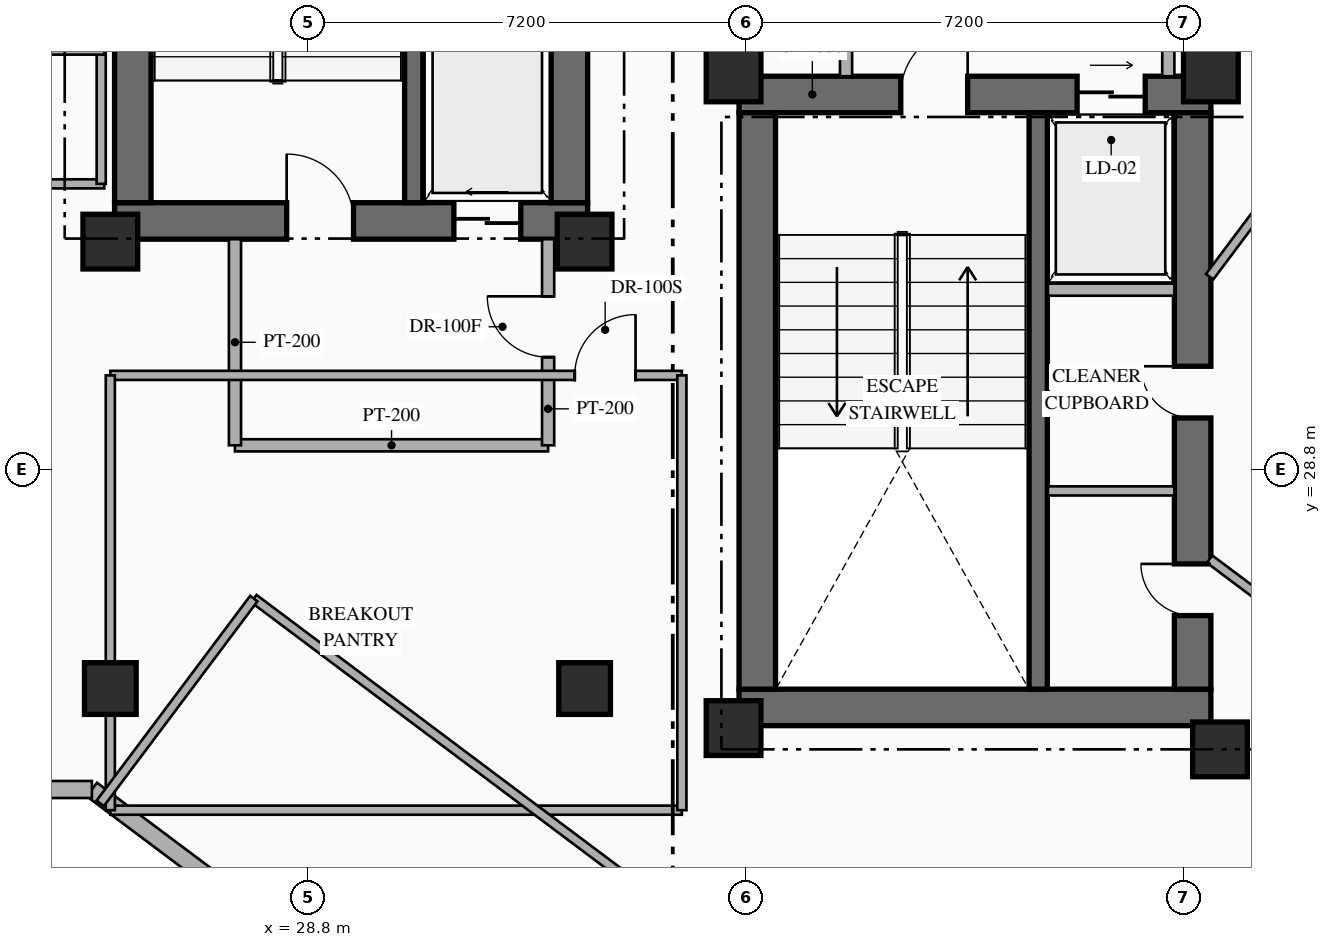
"""IFC4 building model, lengths in metres.
Left out: names, types, materials, properties, quantities, classifications, styles, units other than length and angle.
Written with IfcOpenShell. Run it as: python <this file> out.ifc"""

import sys

from ifc_helpers import new_model, si_unit, direction, frame, frame_2d, origin, origin_2d, place, context, subcontext, project, spatial, rectangle, hollow_rectangle, extrude, element, fill, save


model = new_model("IFC4")
c1 = context("Model", 3, precision=1e-05, world=origin(), true_north=direction((0.0, 1.0)))
c2 = subcontext(c1, "Body", "Model", "MODEL_VIEW")
j1 = project(units=[si_unit("LENGTHUNIT", "METRE"), si_unit("PLANEANGLEUNIT", "RADIAN")], contexts=[c1])
p1 = place(None, origin())
s1 = spatial("IfcSite", under=j1, at=p1, CompositionType="ELEMENT")
p2 = place(p1, origin())
s2 = spatial("IfcBuilding", under=s1, at=p2, CompositionType="ELEMENT")
p3 = place(p2, frame((0.0, 0.0, 134.85)))
s3 = spatial("IfcBuildingStorey", under=s2, at=p3, CompositionType="ELEMENT", Elevation=134.85)
p4 = place(p3, frame((25.62, 32.89, 0.0), z_axis=(0.0, 0.0, 1.0), x_axis=(1.0, 0.0, 0.0)))
e1 = element("IfcWall", 1, at=p4, inside=s3, PredefinedType="SHEAR", context=c2, shape_type="SweptSolid", body=[
    extrude(rectangle(XDim=7.78, YDim=0.6, at=frame_2d((3.89, 0.0))), origin(), (0.0, 0.0, 1.0), 3.6),
])
p5 = place(p4, frame((2.83, 0.0, 0.0)))
e2 = element("IfcOpeningElement", 2, at=p5, cuts=e1, PredefinedType="OPENING", context=c2, shape_type="SweptSolid", body=[
    extrude(rectangle(XDim=1.1, YDim=2.2, at=frame_2d((0.55, 1.1))), frame((0.0, 0.31, 0.0), z_axis=(0.0, -1.0, 0.0), x_axis=(1.0, 0.0, 0.0)), (0.0, 0.0, 1.0), 0.62),
])
p6 = place(p4, frame((5.58, 0.0, 0.0)))
e3 = element("IfcOpeningElement", 3, at=p6, cuts=e1, PredefinedType="OPENING", context=c2, shape_type="SweptSolid", body=[
    extrude(rectangle(XDim=1.1, YDim=2.15, at=frame_2d((0.55, 1.075))), frame((0.0, 0.31, 0.0), z_axis=(0.0, -1.0, 0.0), x_axis=(1.0, 0.0, 0.0)), (0.0, 0.0, 1.0), 0.62),
])
p7 = place(p3, frame((25.92, 33.19, 0.0), z_axis=(0.0, 0.0, 1.0), x_axis=(0.0, 1.0, 0.0)))
e4 = element("IfcWall", 4, at=p7, inside=s3, PredefinedType="SHEAR", context=c2, shape_type="SweptSolid", body=[
    extrude(rectangle(XDim=9.48, YDim=0.6, at=frame_2d((4.74, 0.0))), origin(), (0.0, 0.0, 1.0), 3.6),
])
p8 = place(p3, frame((33.1, 33.19, 0.0), z_axis=(0.0, 0.0, 1.0), x_axis=(0.0, 1.0, 0.0)))
e5 = element("IfcWall", 5, at=p8, inside=s3, PredefinedType="SHEAR", context=c2, shape_type="SweptSolid", body=[
    extrude(rectangle(XDim=9.48, YDim=0.6, at=frame_2d((4.74, 0.0))), origin(), (0.0, 0.0, 1.0), 3.6),
])
p9 = place(p8, frame((4.16, 0.0, 0.0)))
e6 = element("IfcOpeningElement", 6, at=p9, cuts=e5, PredefinedType="OPENING", context=c2, shape_type="SweptSolid", body=[
    extrude(rectangle(XDim=0.85, YDim=2.08, at=frame_2d((0.425, 1.04))), frame((0.0, 0.31, 0.0), z_axis=(0.0, -1.0, 0.0), x_axis=(1.0, 0.0, 0.0)), (0.0, 0.0, 1.0), 0.62),
])
p10 = place(p8, frame((7.36, 0.0, 0.0)))
e7 = element("IfcOpeningElement", 7, at=p10, cuts=e5, PredefinedType="OPENING", context=c2, shape_type="SweptSolid", body=[
    extrude(rectangle(XDim=0.85, YDim=2.08, at=frame_2d((0.425, 1.04))), frame((0.0, 0.31, 0.0), z_axis=(0.0, -1.0, 0.0), x_axis=(1.0, 0.0, 0.0)), (0.0, 0.0, 1.0), 0.62),
])
p11 = place(p3, frame((30.54, 33.19, 0.0), z_axis=(0.0, 0.0, 1.0), x_axis=(0.0, 1.0, 0.0)))
e8 = element("IfcWall", 8, at=p11, inside=s3, PredefinedType="SHEAR", context=c2, shape_type="SweptSolid", body=[
    extrude(rectangle(XDim=9.48, YDim=0.3, at=frame_2d((4.74, 0.0))), origin(), (0.0, 0.0, 1.0), 3.6),
])
p12 = place(p3, frame((35.89, 24.89, 0.0), z_axis=(0.0, 0.0, 1.0), x_axis=(1.0, 0.0, 0.0)))
e9 = element("IfcWall", 9, at=p12, inside=s3, PredefinedType="SHEAR", context=c2, shape_type="SweptSolid", body=[
    extrude(rectangle(XDim=7.76, YDim=0.6, at=frame_2d((3.88, 0.0))), origin(), (0.0, 0.0, 1.0), 3.6),
])
p13 = place(p3, frame((35.89, 34.97, 0.0), z_axis=(0.0, 0.0, 1.0), x_axis=(1.0, 0.0, 0.0)))
e10 = element("IfcWall", 10, at=p13, inside=s3, PredefinedType="SHEAR", context=c2, shape_type="SweptSolid", body=[
    extrude(rectangle(XDim=7.76, YDim=0.6, at=frame_2d((3.88, 0.0))), origin(), (0.0, 0.0, 1.0), 3.6),
])
p14 = place(p13, frame((2.66, 0.0, 0.0)))
e11 = element("IfcOpeningElement", 11, at=p14, cuts=e10, PredefinedType="OPENING", context=c2, shape_type="SweptSolid", body=[
    extrude(rectangle(XDim=1.1, YDim=2.2, at=frame_2d((0.55, 1.1))), frame((0.0, 0.31, 0.0), z_axis=(0.0, -1.0, 0.0), x_axis=(1.0, 0.0, 0.0)), (0.0, 0.0, 1.0), 0.62),
])
p15 = place(p13, frame((5.56, 0.0, 0.0)))
e12 = element("IfcOpeningElement", 12, at=p15, cuts=e10, PredefinedType="OPENING", context=c2, shape_type="SweptSolid", body=[
    extrude(rectangle(XDim=1.12, YDim=2.15, at=frame_2d((0.56, 1.075))), frame((0.0, 0.31, 0.0), z_axis=(0.0, -1.0, 0.0), x_axis=(1.0, 0.0, 0.0)), (0.0, 0.0, 1.0), 0.62),
])
p16 = place(p3, frame((36.19, 25.19, 0.0), z_axis=(0.0, 0.0, 1.0), x_axis=(0.0, 1.0, 0.0)))
e13 = element("IfcWall", 13, at=p16, inside=s3, PredefinedType="SHEAR", context=c2, shape_type="SweptSolid", body=[
    extrude(rectangle(XDim=9.48, YDim=0.6, at=frame_2d((4.74, 0.0))), origin(), (0.0, 0.0, 1.0), 3.6),
])
p17 = place(p3, frame((43.35, 25.19, 0.0), z_axis=(0.0, 0.0, 1.0), x_axis=(0.0, 1.0, 0.0)))
e14 = element("IfcWall", 14, at=p17, inside=s3, PredefinedType="SHEAR", context=c2, shape_type="SweptSolid", body=[
    extrude(rectangle(XDim=9.48, YDim=0.6, at=frame_2d((4.74, 0.0))), origin(), (0.0, 0.0, 1.0), 3.6),
])
p18 = place(p17, frame((1.21, 0.0, 0.0)))
e15 = element("IfcOpeningElement", 15, at=p18, cuts=e14, PredefinedType="OPENING", context=c2, shape_type="SweptSolid", body=[
    extrude(rectangle(XDim=0.85, YDim=2.08, at=frame_2d((0.425, 1.04))), frame((0.0, 0.31, 0.0), z_axis=(0.0, -1.0, 0.0), x_axis=(1.0, 0.0, 0.0)), (0.0, 0.0, 1.0), 0.62),
])
p19 = place(p17, frame((4.46, 0.0, 0.0)))
e16 = element("IfcOpeningElement", 16, at=p19, cuts=e14, PredefinedType="OPENING", context=c2, shape_type="SweptSolid", body=[
    extrude(rectangle(XDim=0.85, YDim=2.08, at=frame_2d((0.425, 1.04))), frame((0.0, 0.31, 0.0), z_axis=(0.0, -1.0, 0.0), x_axis=(1.0, 0.0, 0.0)), (0.0, 0.0, 1.0), 0.62),
])
p20 = place(p3, frame((40.81, 25.19, 0.0), z_axis=(0.0, 0.0, 1.0), x_axis=(0.0, 1.0, 0.0)))
e17 = element("IfcWall", 17, at=p20, inside=s3, PredefinedType="SHEAR", context=c2, shape_type="SweptSolid", body=[
    extrude(rectangle(XDim=9.48, YDim=0.3, at=frame_2d((4.74, 0.0))), origin(), (0.0, 0.0, 1.0), 3.6),
])
for number, where, z_axis, x_axis in (
    (18, (25.55, 32.55, 0.0), (0.0, 0.0, 1.0), (1.0, 0.0, 0.0)),
    (19, (33.35, 32.55, 0.0), (0.0, 0.0, 1.0), (1.0, 0.0, 0.0)),
    (20, (35.8, 24.55, 0.0), (0.0, 0.0, 1.0), (1.0, 0.0, 0.0)),
    (21, (43.8, 24.2, 0.0), (0.0, 0.0, 1.0), (1.0, 0.0, 0.0)),
    (22, (35.8, 35.3, 0.0), (0.0, 0.0, 1.0), (1.0, 0.0, 0.0)),
    (23, (43.65, 35.3, 0.0), (0.0, 0.0, 1.0), (1.0, 0.0, 0.0)),
):
    element("IfcColumn", number, at=place(p3, frame(where, z_axis=z_axis, x_axis=x_axis)), inside=s3, PredefinedType="COLUMN", context=c2, shape_type="SweptSolid", body=[
        extrude(rectangle(XDim=0.9, YDim=0.9, at=origin_2d()), origin(), (0.0, 0.0, 1.0), 3.6),
    ])
for number, where, z_axis, x_axis in (
    (24, (25.55, 25.2, 0.0), (0.0, 0.0, 1.0), (1.0, 0.0, 0.0)),
    (25, (33.35, 25.2, 0.0), (0.0, 0.0, 1.0), (1.0, 0.0, 0.0)),
):
    element("IfcColumn", number, at=place(p3, frame(where, z_axis=z_axis, x_axis=x_axis)), inside=s3, PredefinedType="COLUMN", context=c2, shape_type="SweptSolid", body=[
        extrude(hollow_rectangle(XDim=0.85, YDim=0.85, WallThickness=0.032, at=origin_2d()), origin(), (0.0, 0.0, 1.0), 3.6),
    ])
p21 = place(p3, frame((44.918, 8.787, 0.0), z_axis=(0.0, 0.0, 1.0), x_axis=(-0.800004765927, 0.599993645378, 0.0)))
e26 = element("IfcWall", 26, at=p21, inside=s3, PredefinedType="STANDARD", context=c2, shape_type="SweptSolid", body=[
    extrude(rectangle(XDim=24.588, YDim=0.28, at=frame_2d((12.294, 0.0))), origin(), (0.0, 0.0, 1.0), 3.35),
])
p22 = place(p3, frame((25.247, 23.54, 0.0), z_axis=(0.0, 0.0, 1.0), x_axis=(-1.0, 0.0, 0.0)))
e27 = element("IfcWall", 27, at=p22, inside=s3, PredefinedType="STANDARD", context=c2, shape_type="SweptSolid", body=[
    extrude(rectangle(XDim=6.747, YDim=0.28, at=frame_2d((3.374, 0.0))), origin(), (0.0, 0.0, 1.0), 3.35),
])
p23 = place(p3, frame((40.97, 31.76, 0.0), z_axis=(0.0, 0.0, 1.0), x_axis=(1.0, 0.0, 0.0)))
e28 = element("IfcWall", 28, at=p23, inside=s3, PredefinedType="STANDARD", context=c2, shape_type="SweptSolid", body=[
    extrude(rectangle(XDim=2.08, YDim=0.2, at=frame_2d((1.04, 0.0))), origin(), (0.0, 0.0, 1.0), 3.35),
])
p24 = place(p3, frame((40.97, 28.45, 0.0), z_axis=(0.0, 0.0, 1.0), x_axis=(1.0, 0.0, 0.0)))
e29 = element("IfcWall", 29, at=p24, inside=s3, PredefinedType="PARTITIONING", context=c2, shape_type="SweptSolid", body=[
    extrude(rectangle(XDim=2.08, YDim=0.15, at=frame_2d((1.04, 0.0))), origin(), (0.0, 0.0, 1.0), 3.35),
])
p25 = place(p3, frame((27.6, 29.2, 0.0), z_axis=(0.0, 0.0, 1.0), x_axis=(1.0, 0.0, 0.0)))
e30 = element("IfcWall", 30, at=p25, inside=s3, PredefinedType="STANDARD", context=c2, shape_type="SweptSolid", body=[
    extrude(rectangle(XDim=5.15, YDim=0.2, at=frame_2d((2.575, 0.0))), origin(), (0.0, 0.0, 1.0), 3.35),
])
p26 = place(p3, frame((27.6, 29.2, 0.0), z_axis=(0.0, 0.0, 1.0), x_axis=(0.0, 1.0, 0.0)))
e31 = element("IfcWall", 31, at=p26, inside=s3, PredefinedType="STANDARD", context=c2, shape_type="SweptSolid", body=[
    extrude(rectangle(XDim=3.39, YDim=0.2, at=frame_2d((1.695, 0.0))), origin(), (0.0, 0.0, 1.0), 3.35),
])
p27 = place(p3, frame((32.75, 29.2, 0.0), z_axis=(0.0, 0.0, 1.0), x_axis=(0.0, 1.0, 0.0)))
e32 = element("IfcWall", 32, at=p27, inside=s3, PredefinedType="STANDARD", context=c2, shape_type="SweptSolid", body=[
    extrude(rectangle(XDim=3.39, YDim=0.2, at=frame_2d((1.695, 0.0))), origin(), (0.0, 0.0, 1.0), 3.35),
])
p28 = place(p27, frame((1.45, 0.0, 0.0)))
e33 = element("IfcOpeningElement", 33, at=p28, cuts=e32, PredefinedType="OPENING", context=c2, shape_type="SweptSolid", body=[
    extrude(rectangle(XDim=1.0, YDim=2.2, at=frame_2d((0.5, 1.1))), frame((0.0, 0.11, 0.0), z_axis=(0.0, -1.0, 0.0), x_axis=(1.0, 0.0, 0.0)), (0.0, 0.0, 1.0), 0.22),
])
p29 = place(p3, frame((42.95, 35.27, 0.0), z_axis=(0.0, 0.0, 1.0), x_axis=(0.0, 1.0, 0.0)))
e34 = element("IfcWall", 34, at=p29, inside=s3, PredefinedType="STANDARD", context=c2, shape_type="SweptSolid", body=[
    extrude(rectangle(XDim=2.83, YDim=0.2, at=frame_2d((1.415, 0.0))), origin(), (0.0, 0.0, 1.0), 3.35),
])
p30 = place(p3, frame((37.65, 35.27, 0.0), z_axis=(0.0, 0.0, 1.0), x_axis=(0.0, 1.0, 0.0)))
e35 = element("IfcWall", 35, at=p30, inside=s3, PredefinedType="STANDARD", context=c2, shape_type="SweptSolid", body=[
    extrude(rectangle(XDim=2.83, YDim=0.2, at=frame_2d((1.415, 0.0))), origin(), (0.0, 0.0, 1.0), 3.35),
])
p31 = place(p30, frame((0.915, 0.0, 0.0)))
e36 = element("IfcOpeningElement", 36, at=p31, cuts=e35, PredefinedType="OPENING", context=c2, shape_type="SweptSolid", body=[
    extrude(rectangle(XDim=1.0, YDim=2.2, at=frame_2d((0.5, 1.1))), frame((0.0, 0.11, 0.0), z_axis=(0.0, -1.0, 0.0), x_axis=(1.0, 0.0, 0.0)), (0.0, 0.0, 1.0), 0.22),
])
p32 = place(p3, frame((22.15, 33.5, 0.0), z_axis=(0.0, 0.0, 1.0), x_axis=(1.0, 0.0, 0.0)))
e37 = element("IfcWall", 37, at=p32, inside=s3, PredefinedType="PARTITIONING", context=c2, shape_type="SweptSolid", body=[
    extrude(rectangle(XDim=3.3, YDim=0.15, at=frame_2d((1.65, 0.0))), origin(), (0.0, 0.0, 1.0), 3.35),
])
p33 = place(p3, frame((25.4, 33.5, 0.0), z_axis=(0.0, 0.0, 1.0), x_axis=(0.0, 1.0, 0.0)))
e38 = element("IfcWall", 38, at=p33, inside=s3, PredefinedType="PARTITIONING", context=c2, shape_type="SweptSolid", body=[
    extrude(rectangle(XDim=6.6, YDim=0.15, at=frame_2d((3.3, 0.0))), origin(), (0.0, 0.0, 1.0), 3.35),
])
p34 = place(p3, frame((22.15, 35.7, 0.0), z_axis=(0.0, 0.0, 1.0), x_axis=(1.0, 0.0, 0.0)))
e39 = element("IfcWall", 39, at=p34, inside=s3, PredefinedType="PARTITIONING", context=c2, shape_type="SweptSolid", body=[
    extrude(rectangle(XDim=3.3, YDim=0.15, at=frame_2d((1.65, 0.0))), origin(), (0.0, 0.0, 1.0), 3.35),
])
p35 = place(p3, frame((25.55, 23.2, 0.0), z_axis=(0.0, 0.0, 1.0), x_axis=(1.0, 0.0, 0.0)))
e40 = element("IfcWall", 40, at=p35, inside=s3, PredefinedType="PARTITIONING", context=c2, shape_type="SweptSolid", body=[
    extrude(rectangle(XDim=9.4, YDim=0.15, at=frame_2d((4.7, 0.0))), origin(), (0.0, 0.0, 1.0), 3.35),
])
p36 = place(p3, frame((25.55, 30.35, 0.0), z_axis=(0.0, 0.0, 1.0), x_axis=(1.0, 0.0, 0.0)))
e41 = element("IfcWall", 41, at=p36, inside=s3, PredefinedType="PARTITIONING", context=c2, shape_type="SweptSolid", body=[
    extrude(rectangle(XDim=9.4, YDim=0.15, at=frame_2d((4.7, 0.0))), origin(), (0.0, 0.0, 1.0), 3.35),
])
p37 = place(p36, frame((7.638, 0.0, 0.0)))
e42 = element("IfcOpeningElement", 42, at=p37, cuts=e41, PredefinedType="OPENING", context=c2, shape_type="SweptSolid", body=[
    extrude(rectangle(XDim=1.0, YDim=2.15, at=frame_2d((0.5, 1.075))), frame((0.0, 0.085, 0.0), z_axis=(0.0, -1.0, 0.0), x_axis=(1.0, 0.0, 0.0)), (0.0, 0.0, 1.0), 0.17),
])
p38 = place(p3, frame((25.55, 23.2, 0.0), z_axis=(0.0, 0.0, 1.0), x_axis=(0.0, 1.0, 0.0)))
e43 = element("IfcWall", 43, at=p38, inside=s3, PredefinedType="PARTITIONING", context=c2, shape_type="SweptSolid", body=[
    extrude(rectangle(XDim=7.15, YDim=0.15, at=frame_2d((3.575, 0.0))), origin(), (0.0, 0.0, 1.0), 2.695),
])
p39 = place(p3, frame((34.95, 23.2, 0.0), z_axis=(0.0, 0.0, 1.0), x_axis=(0.0, 1.0, 0.0)))
e44 = element("IfcWall", 44, at=p39, inside=s3, PredefinedType="PARTITIONING", context=c2, shape_type="SweptSolid", body=[
    extrude(rectangle(XDim=7.15, YDim=0.15, at=frame_2d((3.575, 0.0))), origin(), (0.0, 0.0, 1.0), 3.35),
])
p40 = place(p3, frame((41.87, 17.96, 0.0), z_axis=(0.0, 0.0, 1.0), x_axis=(0.599994172676, 0.80000437046, 0.0)))
e45 = element("IfcWall", 45, at=p40, inside=s3, PredefinedType="PARTITIONING", context=c2, shape_type="SweptSolid", body=[
    extrude(rectangle(XDim=20.11, YDim=0.15, at=frame_2d((10.055, 0.0))), origin(), (0.0, 0.0, 1.0), 3.35),
])
p41 = place(p40, frame((9.58, 0.0, 0.0)))
e46 = element("IfcOpeningElement", 46, at=p41, cuts=e45, PredefinedType="OPENING", context=c2, shape_type="SweptSolid", body=[
    extrude(rectangle(XDim=0.95, YDim=2.15, at=frame_2d((0.475, 1.075))), frame((0.0, 0.085, 0.0), z_axis=(0.0, -1.0, 0.0), x_axis=(1.0, 0.0, 0.0)), (0.0, 0.0, 1.0), 0.17),
])
p42 = place(p3, frame((43.63, 27.328, 0.0), z_axis=(0.0, 0.0, 1.0), x_axis=(0.799972182084, -0.600037088764, 0.0)))
e47 = element("IfcWall", 47, at=p42, inside=s3, PredefinedType="PARTITIONING", context=c2, shape_type="SweptSolid", body=[
    extrude(rectangle(XDim=4.213, YDim=0.15, at=frame_2d((2.106, 0.0))), origin(), (0.0, 0.0, 1.0), 3.045),
])
p43 = place(p42, frame((1.256, 0.0, 0.0)))
e48 = element("IfcOpeningElement", 48, at=p43, cuts=e47, PredefinedType="OPENING", context=c2, shape_type="SweptSolid", body=[
    extrude(rectangle(XDim=0.95, YDim=2.15, at=frame_2d((0.475, 1.075))), frame((0.0, 0.085, 0.0), z_axis=(0.0, -1.0, 0.0), x_axis=(1.0, 0.0, 0.0)), (0.0, 0.0, 1.0), 0.17),
])
p44 = place(p3, frame((43.63, 31.973, 0.0), z_axis=(0.0, 0.0, 1.0), x_axis=(0.599975099311, 0.800018674911, 0.0)))
e49 = element("IfcWall", 49, at=p44, inside=s3, PredefinedType="PARTITIONING", context=c2, shape_type="SweptSolid", body=[
    extrude(rectangle(XDim=7.844, YDim=0.15, at=frame_2d((3.922, 0.0))), origin(), (0.0, 0.0, 1.0), 3.35),
])
p45 = place(p3, frame((27.91, 26.68, 0.0), z_axis=(0.0, 0.0, 1.0), x_axis=(0.800005938517, -0.599992081896, 0.0)))
e50 = element("IfcWall", 50, at=p45, inside=s3, PredefinedType="PARTITIONING", context=c2, shape_type="SweptSolid", body=[
    extrude(rectangle(XDim=14.8, YDim=0.15, at=frame_2d((7.4, 0.0))), origin(), (0.0, 0.0, 1.0), 3.35),
])
p46 = place(p45, frame((9.281, 0.0, 0.0)))
e51 = element("IfcOpeningElement", 51, at=p46, cuts=e50, PredefinedType="OPENING", context=c2, shape_type="SweptSolid", body=[
    extrude(rectangle(XDim=0.95, YDim=2.15, at=frame_2d((0.475, 1.075))), frame((0.0, 0.085, 0.0), z_axis=(0.0, -1.0, 0.0), x_axis=(1.0, 0.0, 0.0)), (0.0, 0.0, 1.0), 0.17),
])
p47 = place(p3, frame((25.384, 23.312, 0.0), z_axis=(0.0, 0.0, 1.0), x_axis=(0.599990721155, 0.80000695905, 0.0)))
e52 = element("IfcWall", 52, at=p47, inside=s3, PredefinedType="PARTITIONING", context=c2, shape_type="SweptSolid", body=[
    extrude(rectangle(XDim=4.21, YDim=0.15, at=frame_2d((2.105, 0.0))), origin(), (0.0, 0.0, 1.0), 3.35),
])
p48 = place(p5, origin())
e53 = element("IfcDoor", 53, at=p48, inside=s3, OperationType="SINGLE_SWING_LEFT", PredefinedType="DOOR", context=c2, shape_type="SweptSolid", body=[
    extrude(rectangle(XDim=1.1, YDim=2.2, at=frame_2d((0.55, 1.1))), frame((0.0, 0.025, 0.0), z_axis=(0.0, -1.0, 0.0), x_axis=(1.0, 0.0, 0.0)), (0.0, 0.0, 1.0), 0.05),
])
fill(e2, e53)
p49 = place(p6, origin())
e54 = element("IfcDoor", 54, at=p49, inside=s3, OperationType="SLIDING_TO_LEFT", PredefinedType="USERDEFINED", context=c2, shape_type="SweptSolid", body=[
    extrude(rectangle(XDim=1.1, YDim=2.15, at=frame_2d((0.55, 1.075))), frame((0.0, 0.025, 0.0), z_axis=(0.0, -1.0, 0.0), x_axis=(1.0, 0.0, 0.0)), (0.0, 0.0, 1.0), 0.05),
])
fill(e3, e54)
p50 = place(p14, origin())
e55 = element("IfcDoor", 55, at=p50, inside=s3, OperationType="SINGLE_SWING_RIGHT", PredefinedType="DOOR", context=c2, shape_type="SweptSolid", body=[
    extrude(rectangle(XDim=1.1, YDim=2.2, at=frame_2d((0.55, 1.1))), frame((0.0, 0.025, 0.0), z_axis=(0.0, -1.0, 0.0), x_axis=(1.0, 0.0, 0.0)), (0.0, 0.0, 1.0), 0.05),
])
fill(e11, e55)
p51 = place(p15, origin())
e56 = element("IfcDoor", 56, at=p51, inside=s3, OperationType="SLIDING_TO_RIGHT", PredefinedType="USERDEFINED", context=c2, shape_type="SweptSolid", body=[
    extrude(rectangle(XDim=1.12, YDim=2.15, at=frame_2d((0.56, 1.075))), frame((0.0, 0.025, 0.0), z_axis=(0.0, -1.0, 0.0), x_axis=(1.0, 0.0, 0.0)), (0.0, 0.0, 1.0), 0.05),
])
fill(e12, e56)
p52 = place(p18, origin())
e57 = element("IfcDoor", 57, at=p52, inside=s3, OperationType="SINGLE_SWING_RIGHT", PredefinedType="DOOR", context=c2, shape_type="SweptSolid", body=[
    extrude(rectangle(XDim=0.85, YDim=2.08, at=frame_2d((0.425, 1.04))), frame((0.0, 0.025, 0.0), z_axis=(0.0, -1.0, 0.0), x_axis=(1.0, 0.0, 0.0)), (0.0, 0.0, 1.0), 0.05),
])
fill(e15, e57)
p53 = place(p19, origin())
e58 = element("IfcDoor", 58, at=p53, inside=s3, OperationType="SINGLE_SWING_RIGHT", PredefinedType="DOOR", context=c2, shape_type="SweptSolid", body=[
    extrude(rectangle(XDim=0.85, YDim=2.08, at=frame_2d((0.425, 1.04))), frame((0.0, 0.025, 0.0), z_axis=(0.0, -1.0, 0.0), x_axis=(1.0, 0.0, 0.0)), (0.0, 0.0, 1.0), 0.05),
])
fill(e16, e58)
p54 = place(p28, origin())
e59 = element("IfcDoor", 59, at=p54, inside=s3, OperationType="SINGLE_SWING_RIGHT", PredefinedType="DOOR", context=c2, shape_type="SweptSolid", body=[
    extrude(rectangle(XDim=1.0, YDim=2.2, at=frame_2d((0.5, 1.1))), frame((0.0, 0.025, 0.0), z_axis=(0.0, -1.0, 0.0), x_axis=(1.0, 0.0, 0.0)), (0.0, 0.0, 1.0), 0.05),
])
fill(e33, e59)
p55 = place(p37, origin())
e60 = element("IfcDoor", 60, at=p55, inside=s3, OperationType="SINGLE_SWING_RIGHT", PredefinedType="DOOR", context=c2, shape_type="SweptSolid", body=[
    extrude(rectangle(XDim=1.0, YDim=2.15, at=frame_2d((0.5, 1.075))), frame((0.0, 0.025, 0.0), z_axis=(0.0, -1.0, 0.0), x_axis=(1.0, 0.0, 0.0)), (0.0, 0.0, 1.0), 0.05),
])
fill(e42, e60)
save(model, sys.argv[1])
